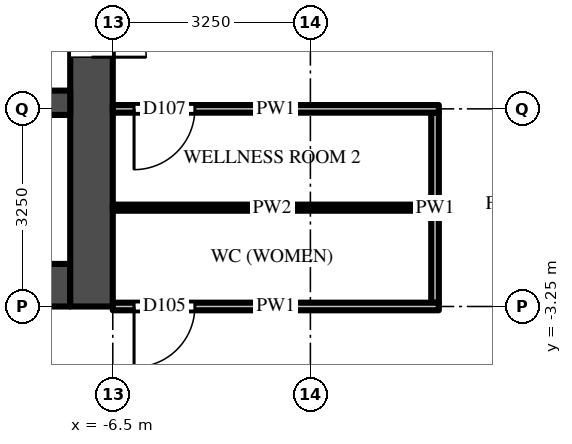
"""IFC4 building model, lengths in metres.
Left out: names, types, materials, properties, quantities, classifications, styles, units other than length and angle.
Written with IfcOpenShell. Run it as: python <this file> out.ifc"""

import sys

from ifc_helpers import new_model, si_unit, direction, frame, frame_2d, origin, place, context, subcontext, project, spatial, rectangle, extrude, source, transform, mapped, element, fill, save


model = new_model("IFC4")
c1 = context("Model", 3, precision=1e-05, world=origin(), true_north=direction((0.0, 1.0)))
c2 = subcontext(c1, "Body", "Model", "MODEL_VIEW")
j1 = project(units=[si_unit("LENGTHUNIT", "METRE"), si_unit("PLANEANGLEUNIT", "RADIAN")], contexts=[c1])
p1 = place(None, origin())
s1 = spatial("IfcSite", under=j1, at=p1, CompositionType="ELEMENT")
p2 = place(p1, origin())
s2 = spatial("IfcBuilding", under=s1, at=p2, CompositionType="ELEMENT")
p3 = place(p2, frame((0.0, 0.0, 88.0)))
s3 = spatial("IfcBuildingStorey", under=s2, at=p3, CompositionType="ELEMENT", Elevation=88.0)
m1 = source(origin(), c2, "Body", "SweptSolid", [
    extrude(rectangle(XDim=14.85, YDim=0.7, at=frame_2d((7.425, 0.0))), origin(), (0.0, 0.0, 1.0), 4.2),
])
p4 = place(p3, frame((-7.2, -2.9, 0.0), z_axis=(0.0, 0.0, 1.0), x_axis=(-1.0, 0.0, 0.0)))
e1 = element("IfcWall", 1, at=p4, inside=s3, PredefinedType="SHEAR", context=c2, shape_type="MappedRepresentation", body=[
    mapped(m1, transform((0.0, 0.0, 0.0))),
])
m2 = source(origin(), c2, "Body", "SweptSolid", [
    extrude(rectangle(XDim=1.3, YDim=2.1, at=frame_2d((0.65, 1.05))), frame((0.0, 0.36, 0.0), z_axis=(0.0, -1.0, 0.0), x_axis=(1.0, 0.0, 0.0)), (0.0, 0.0, 1.0), 0.72),
])
p5 = place(p4, frame((12.2, 0.0, 0.0)))
e2 = element("IfcOpeningElement", 2, at=p5, cuts=e1, PredefinedType="OPENING", context=c2, shape_type="MappedRepresentation", body=[
    mapped(m2, transform((0.0, 0.0, 0.0))),
])
m3 = source(origin(), c2, "Body", "SweptSolid", [
    extrude(rectangle(XDim=1.2, YDim=2.1, at=frame_2d((0.6, 1.05))), frame((0.0, 0.36, 0.0), z_axis=(0.0, -1.0, 0.0), x_axis=(1.0, 0.0, 0.0)), (0.0, 0.0, 1.0), 0.72),
])
p6 = place(p4, frame((9.85, 0.0, 0.0)))
e3 = element("IfcOpeningElement", 3, at=p6, cuts=e1, PredefinedType="OPENING", context=c2, shape_type="MappedRepresentation", body=[
    mapped(m3, transform((0.0, 0.0, 0.0))),
])
m4 = source(origin(), c2, "Body", "SweptSolid", [
    extrude(rectangle(XDim=1.0, YDim=2.1, at=frame_2d((0.5, 1.05))), frame((0.0, 0.36, 0.0), z_axis=(0.0, -1.0, 0.0), x_axis=(1.0, 0.0, 0.0)), (0.0, 0.0, 1.0), 0.72),
])
p7 = place(p4, frame((7.9, 0.0, 0.0)))
e4 = element("IfcOpeningElement", 4, at=p7, cuts=e1, PredefinedType="OPENING", context=c2, shape_type="MappedRepresentation", body=[
    mapped(m4, transform((0.0, 0.0, 0.0))),
])
p8 = place(p4, frame((0.6, 0.0, 0.0)))
e5 = element("IfcOpeningElement", 5, at=p8, cuts=e1, PredefinedType="OPENING", context=c2, shape_type="MappedRepresentation", body=[
    mapped(m4, transform((0.0, 0.0, 0.0))),
])
m5 = source(origin(), c2, "Body", "SweptSolid", [
    extrude(rectangle(XDim=0.9, YDim=2.1, at=frame_2d((0.45, 1.05))), frame((0.0, 0.36, 0.0), z_axis=(0.0, -1.0, 0.0), x_axis=(1.0, 0.0, 0.0)), (0.0, 0.0, 1.0), 0.72),
])
p9 = place(p4, frame((3.25, 0.0, 0.0)))
e6 = element("IfcOpeningElement", 6, at=p9, cuts=e1, PredefinedType="OPENING", context=c2, shape_type="MappedRepresentation", body=[
    mapped(m5, transform((0.0, 0.0, 0.0))),
])
p10 = place(p4, frame((5.85, 0.0, 0.0)))
e7 = element("IfcOpeningElement", 7, at=p10, cuts=e1, PredefinedType="OPENING", context=c2, shape_type="MappedRepresentation", body=[
    mapped(m5, transform((0.0, 0.0, 0.0))),
])
m6 = source(origin(), c2, "Body", "SweptSolid", [
    extrude(rectangle(XDim=9.05, YDim=0.7, at=frame_2d((4.525, 0.0))), origin(), (0.0, 0.0, 1.0), 4.2),
])
p11 = place(p3, frame((-6.85, 5.8, 0.0), z_axis=(0.0, 0.0, 1.0), x_axis=(0.0, -1.0, 0.0)))
e8 = element("IfcWall", 8, at=p11, inside=s3, PredefinedType="SHEAR", context=c2, shape_type="MappedRepresentation", body=[
    mapped(m6, transform((0.0, 0.0, 0.0))),
])
m7 = source(origin(), c2, "Body", "SweptSolid", [
    extrude(rectangle(XDim=1.8, YDim=2.1, at=frame_2d((0.9, 1.05))), frame((0.0, 0.36, 0.0), z_axis=(0.0, -1.0, 0.0), x_axis=(1.0, 0.0, 0.0)), (0.0, 0.0, 1.0), 0.72),
])
p12 = place(p11, frame((3.15, 0.0, 0.0)))
e9 = element("IfcOpeningElement", 9, at=p12, cuts=e8, PredefinedType="OPENING", context=c2, shape_type="MappedRepresentation", body=[
    mapped(m7, transform((0.0, 0.0, 0.0))),
])
m8 = source(origin(), c2, "Body", "SweptSolid", [
    extrude(rectangle(XDim=14.85, YDim=0.4, at=frame_2d((7.425, 0.0))), origin(), (0.0, 0.0, 1.0), 4.2),
])
p13 = place(p3, frame((-7.2, 0.1, 0.0), z_axis=(0.0, 0.0, 1.0), x_axis=(-1.0, 0.0, 0.0)))
e10 = element("IfcWall", 10, at=p13, inside=s3, PredefinedType="SHEAR", context=c2, shape_type="MappedRepresentation", body=[
    mapped(m8, transform((0.0, 0.0, 0.0))),
])
m9 = source(origin(), c2, "Body", "SweptSolid", [
    extrude(rectangle(XDim=1.0, YDim=2.1, at=frame_2d((0.5, 1.05))), frame((0.0, 0.21, 0.0), z_axis=(0.0, -1.0, 0.0), x_axis=(1.0, 0.0, 0.0)), (0.0, 0.0, 1.0), 0.42),
])
p14 = place(p13, frame((7.9, 0.0, 0.0)))
e11 = element("IfcOpeningElement", 11, at=p14, cuts=e10, PredefinedType="OPENING", context=c2, shape_type="MappedRepresentation", body=[
    mapped(m9, transform((0.0, 0.0, 0.0))),
])
m10 = source(origin(), c2, "Body", "SweptSolid", [
    extrude(rectangle(XDim=3.125, YDim=0.125, at=frame_2d((1.562, 0.0))), origin(), (0.0, 0.0, 1.0), 3.496),
])
p15 = place(p3, frame((-1.2, -0.062, 0.0), z_axis=(0.0, 0.0, 1.0), x_axis=(0.0, -1.0, 0.0)))
e12 = element("IfcWall", 12, at=p15, inside=s3, PredefinedType="PARTITIONING", context=c2, shape_type="MappedRepresentation", body=[
    mapped(m10, transform((0.0, 0.0, 0.0))),
])
m11 = source(origin(), c2, "Body", "SweptSolid", [
    extrude(rectangle(XDim=5.363, YDim=0.125, at=frame_2d((2.681, 0.0))), origin(), (0.0, 0.0, 1.0), 3.418),
])
p16 = place(p3, frame((-1.137, -3.25, 0.0), z_axis=(0.0, 0.0, 1.0), x_axis=(-1.0, 0.0, 0.0)))
e13 = element("IfcWall", 13, at=p16, inside=s3, PredefinedType="PARTITIONING", context=c2, shape_type="MappedRepresentation", body=[
    mapped(m11, transform((0.0, 0.0, 0.0))),
])
m12 = source(origin(), c2, "Body", "SweptSolid", [
    extrude(rectangle(XDim=1.0, YDim=2.1, at=frame_2d((0.5, 1.05))), frame((0.0, 0.073, 0.0), z_axis=(0.0, -1.0, 0.0), x_axis=(1.0, 0.0, 0.0)), (0.0, 0.0, 1.0), 0.145),
])
p17 = place(p16, frame((4.012, 0.0, 0.0)))
e14 = element("IfcOpeningElement", 14, at=p17, cuts=e13, PredefinedType="OPENING", context=c2, shape_type="MappedRepresentation", body=[
    mapped(m12, transform((0.0, 0.0, 0.0))),
])
p18 = place(p3, frame((-6.5, -1.625, 0.0), z_axis=(0.0, 0.0, 1.0), x_axis=(1.0, 0.0, 0.0)))
e15 = element("IfcWall", 15, at=p18, inside=s3, PredefinedType="PARTITIONING", context=c2, shape_type="SweptSolid", body=[
    extrude(rectangle(XDim=5.238, YDim=0.1, at=frame_2d((2.619, 0.0))), origin(), (0.0, 0.0, 1.0), 3.418),
])
p19 = place(p3, frame((-1.137, 0.0, 0.0), z_axis=(0.0, 0.0, 1.0), x_axis=(-1.0, 0.0, 0.0)))
e16 = element("IfcWall", 16, at=p19, inside=s3, PredefinedType="PARTITIONING", context=c2, shape_type="MappedRepresentation", body=[
    mapped(m11, transform((0.0, 0.0, 0.0))),
])
p20 = place(p19, frame((4.012, 0.0, 0.0)))
e17 = element("IfcOpeningElement", 17, at=p20, cuts=e16, PredefinedType="OPENING", context=c2, shape_type="MappedRepresentation", body=[
    mapped(m12, transform((0.0, 0.0, 0.0))),
])
m13 = source(origin(), c2, "Body", "SweptSolid", [
    extrude(rectangle(XDim=1.8, YDim=2.1, at=frame_2d((0.9, 1.05))), frame((0.0, -0.275, 0.0), z_axis=(0.0, -1.0, 0.0), x_axis=(1.0, 0.0, 0.0)), (0.0, 0.0, 1.0), 0.05),
])
p21 = place(p12, origin())
e18 = element("IfcDoor", 18, at=p21, inside=s3, OperationType="DOUBLE_DOOR_SINGLE_SWING", PredefinedType="DOOR", context=c2, shape_type="MappedRepresentation", body=[
    mapped(m13, transform((0.0, 0.0, 0.0))),
])
fill(e9, e18)
m14 = source(origin(), c2, "Body", "SweptSolid", [
    extrude(rectangle(XDim=1.0, YDim=2.1, at=frame_2d((0.5, 1.05))), frame((0.0, 0.025, 0.0), z_axis=(0.0, -1.0, 0.0), x_axis=(1.0, 0.0, 0.0)), (0.0, 0.0, 1.0), 0.05),
])
p22 = place(p17, origin())
e19 = element("IfcDoor", 19, at=p22, inside=s3, OperationType="SINGLE_SWING_RIGHT", PredefinedType="DOOR", context=c2, shape_type="MappedRepresentation", body=[
    mapped(m14, transform((0.0, 0.0, 0.0))),
])
fill(e14, e19)
p23 = place(p20, origin())
e20 = element("IfcDoor", 20, at=p23, inside=s3, OperationType="SINGLE_SWING_RIGHT", PredefinedType="DOOR", context=c2, shape_type="MappedRepresentation", body=[
    mapped(m14, transform((0.0, 0.0, 0.0))),
])
fill(e17, e20)
save(model, sys.argv[1])
